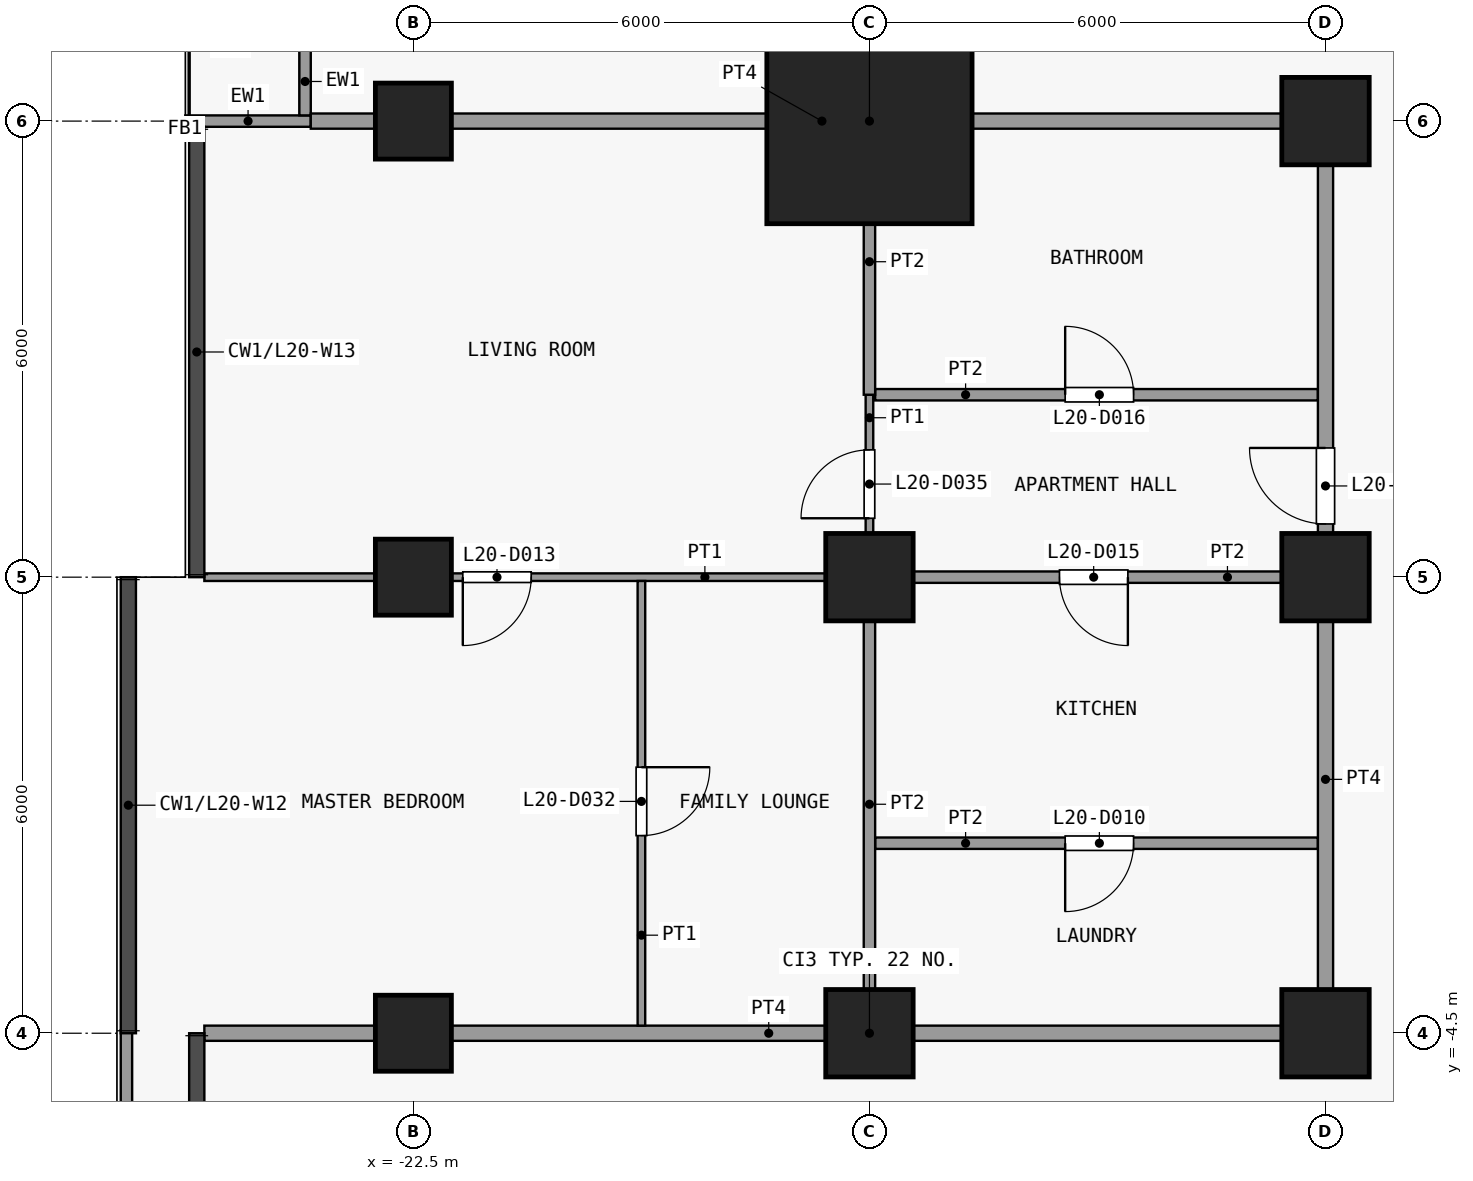
"""IFC4 building model, lengths in metres.
Left out: names, types, materials, properties, quantities, classifications, styles, units other than length and angle.
Written with IfcOpenShell. Run it as: python <this file> out.ifc"""

import sys

from ifc_helpers import new_model, si_unit, direction, frame, frame_2d, origin, origin_2d, place, context, subcontext, project, spatial, rectangle, extrude, element, fill, save


model = new_model("IFC4")
c1 = context("Model", 3, precision=1e-05, world=origin(), true_north=direction((0.0, 1.0)))
c2 = subcontext(c1, "Body", "Model", "MODEL_VIEW")
j1 = project(units=[si_unit("LENGTHUNIT", "METRE"), si_unit("PLANEANGLEUNIT", "RADIAN")], contexts=[c1])
p1 = place(None, origin())
s1 = spatial("IfcSite", under=j1, at=p1, CompositionType="ELEMENT")
p2 = place(p1, origin())
s2 = spatial("IfcBuilding", under=s1, at=p2, CompositionType="ELEMENT")
p3 = place(p2, frame((0.0, 0.0, 84.7)))
s3 = spatial("IfcBuildingStorey", under=s2, at=p3, CompositionType="ELEMENT", Elevation=84.7)
for number, where, z_axis, x_axis in (
    (1, (-22.5, -4.5, 0.0), (0.0, 0.0, 1.0), (1.0, 0.0, 0.0)),
    (2, (-22.5, 1.5, 0.0), (0.0, 0.0, 1.0), (1.0, 0.0, 0.0)),
    (3, (-22.5, 7.5, 0.0), (0.0, 0.0, 1.0), (1.0, 0.0, 0.0)),
):
    element("IfcColumn", number, at=place(p3, frame(where, z_axis=z_axis, x_axis=x_axis)), inside=s3, PredefinedType="COLUMN", context=c2, shape_type="SweptSolid", body=[
        extrude(rectangle(XDim=1.0, YDim=1.0, at=origin_2d()), origin(), (0.0, 0.0, 1.0), 3.6),
    ])
for number, where, z_axis, x_axis in (
    (4, (-16.5, -4.5, 0.0), (0.0, 0.0, 1.0), (1.0, 0.0, 0.0)),
    (5, (-16.5, 1.5, 0.0), (0.0, 0.0, 1.0), (1.0, 0.0, 0.0)),
):
    element("IfcColumn", number, at=place(p3, frame(where, z_axis=z_axis, x_axis=x_axis)), inside=s3, PredefinedType="COLUMN", context=c2, shape_type="SweptSolid", body=[
        extrude(rectangle(XDim=1.15, YDim=1.15, at=origin_2d()), origin(), (0.0, 0.0, 1.0), 3.6),
    ])
p4 = place(p3, frame((-16.5, 7.5, 0.0), z_axis=(0.0, 0.0, 1.0), x_axis=(1.0, 0.0, 0.0)))
e6 = element("IfcColumn", 6, at=p4, inside=s3, PredefinedType="COLUMN", context=c2, shape_type="SweptSolid", body=[
    extrude(rectangle(XDim=2.7, YDim=2.7, at=origin_2d()), origin(), (0.0, 0.0, 1.0), 3.6),
])
for number, where, z_axis, x_axis in (
    (7, (-10.5, -4.5, 0.0), (0.0, 0.0, 1.0), (1.0, 0.0, 0.0)),
    (8, (-10.5, 1.5, 0.0), (0.0, 0.0, 1.0), (1.0, 0.0, 0.0)),
    (9, (-10.5, 7.5, 0.0), (0.0, 0.0, 1.0), (1.0, 0.0, 0.0)),
):
    element("IfcColumn", number, at=place(p3, frame(where, z_axis=z_axis, x_axis=x_axis)), inside=s3, PredefinedType="COLUMN", context=c2, shape_type="SweptSolid", body=[
        extrude(rectangle(XDim=1.15, YDim=1.15, at=origin_2d()), origin(), (0.0, 0.0, 1.0), 3.6),
    ])
p5 = place(p3, frame((-23.85, 7.5, 0.0), z_axis=(0.0, 0.0, 1.0), x_axis=(-1.0, 0.0, 0.0)))
e10 = element("IfcWall", 10, at=p5, inside=s3, PredefinedType="SOLIDWALL", context=c2, shape_type="SweptSolid", body=[
    extrude(rectangle(XDim=1.65, YDim=0.15, at=frame_2d((0.825, 0.0))), origin(), (0.0, 0.0, 1.0), 3.3),
])
p6 = place(p3, frame((-23.925, 7.575, 0.0), z_axis=(0.0, 0.0, 1.0), x_axis=(0.0, 1.0, 0.0)))
e11 = element("IfcWall", 11, at=p6, inside=s3, PredefinedType="SOLIDWALL", context=c2, shape_type="SweptSolid", body=[
    extrude(rectangle(XDim=5.85, YDim=0.15, at=frame_2d((2.925, 0.0))), origin(), (0.0, 0.0, 1.0), 3.3),
])
p7 = place(p6, frame((3.825, 0.0, 0.0)))
e12 = element("IfcOpeningElement", 12, at=p7, cuts=e11, PredefinedType="OPENING", context=c2, shape_type="SweptSolid", body=[
    extrude(rectangle(XDim=1.2, YDim=2.4, at=frame_2d((0.6, 1.2))), frame((0.0, 0.085, 0.0), z_axis=(0.0, -1.0, 0.0), x_axis=(1.0, 0.0, 0.0)), (0.0, 0.0, 1.0), 0.17),
])
p8 = place(p6, frame((1.012, 0.0, 0.9)))
e13 = element("IfcOpeningElement", 13, at=p8, cuts=e11, PredefinedType="OPENING", context=c2, shape_type="SweptSolid", body=[
    extrude(rectangle(XDim=1.8, YDim=2.1, at=frame_2d((0.9, 1.05))), frame((0.0, 0.085, 0.0), z_axis=(0.0, -1.0, 0.0), x_axis=(1.0, 0.0, 0.0)), (0.0, 0.0, 1.0), 0.17),
])
p9 = place(p3, frame((-26.275, -13.3, 0.0), z_axis=(0.0, 0.0, 1.0), x_axis=(0.0, 1.0, 0.0)))
e14 = element("IfcWall", 14, at=p9, inside=s3, PredefinedType="PARAPET", context=c2, shape_type="SweptSolid", body=[
    extrude(rectangle(XDim=8.84, YDim=0.15, at=frame_2d((4.42, 0.0))), origin(), (0.0, 0.0, 1.0), 1.15),
])
p10 = place(p3, frame((-25.25, -4.5, 0.0), z_axis=(0.0, 0.0, 1.0), x_axis=(1.0, 0.0, 0.0)))
e15 = element("IfcWall", 15, at=p10, inside=s3, PredefinedType="PARTITIONING", context=c2, shape_type="SweptSolid", body=[
    extrude(rectangle(XDim=14.85, YDim=0.2, at=frame_2d((7.425, 0.0))), origin(), (0.0, 0.0, 1.0), 3.3),
])
p11 = place(p3, frame((-16.425, -2.0, 0.0), z_axis=(0.0, 0.0, 1.0), x_axis=(1.0, 0.0, 0.0)))
e16 = element("IfcWall", 16, at=p11, inside=s3, PredefinedType="PARTITIONING", context=c2, shape_type="SweptSolid", body=[
    extrude(rectangle(XDim=5.825, YDim=0.15, at=frame_2d((2.913, 0.0))), origin(), (0.0, 0.0, 1.0), 3.3),
])
p12 = place(p11, frame((2.5, 0.0, 0.0)))
e17 = element("IfcOpeningElement", 17, at=p12, cuts=e16, PredefinedType="OPENING", context=c2, shape_type="SweptSolid", body=[
    extrude(rectangle(XDim=0.9, YDim=2.1, at=frame_2d((0.45, 1.05))), frame((0.0, 0.085, 0.0), z_axis=(0.0, -1.0, 0.0), x_axis=(1.0, 0.0, 0.0)), (0.0, 0.0, 1.0), 0.17),
])
p13 = place(p3, frame((-25.25, 1.5, 0.0), z_axis=(0.0, 0.0, 1.0), x_axis=(1.0, 0.0, 0.0)))
e18 = element("IfcWall", 18, at=p13, inside=s3, PredefinedType="PARTITIONING", context=c2, shape_type="SweptSolid", body=[
    extrude(rectangle(XDim=8.75, YDim=0.1, at=frame_2d((4.375, 0.0))), origin(), (0.0, 0.0, 1.0), 3.3),
])
p14 = place(p13, frame((3.4, 0.0, 0.0)))
e19 = element("IfcOpeningElement", 19, at=p14, cuts=e18, PredefinedType="OPENING", context=c2, shape_type="SweptSolid", body=[
    extrude(rectangle(XDim=0.9, YDim=2.1, at=frame_2d((0.45, 1.05))), frame((0.0, 0.06, 0.0), z_axis=(0.0, -1.0, 0.0), x_axis=(1.0, 0.0, 0.0)), (0.0, 0.0, 1.0), 0.12),
])
p15 = place(p3, frame((-16.5, 1.5, 0.0), z_axis=(0.0, 0.0, 1.0), x_axis=(1.0, 0.0, 0.0)))
e20 = element("IfcWall", 20, at=p15, inside=s3, PredefinedType="PARTITIONING", context=c2, shape_type="SweptSolid", body=[
    extrude(rectangle(XDim=5.9, YDim=0.15, at=frame_2d((2.95, 0.0))), origin(), (0.0, 0.0, 1.0), 3.3),
])
p16 = place(p15, frame((2.5, 0.0, 0.0)))
e21 = element("IfcOpeningElement", 21, at=p16, cuts=e20, PredefinedType="OPENING", context=c2, shape_type="SweptSolid", body=[
    extrude(rectangle(XDim=0.9, YDim=2.1, at=frame_2d((0.45, 1.05))), frame((0.0, 0.085, 0.0), z_axis=(0.0, -1.0, 0.0), x_axis=(1.0, 0.0, 0.0)), (0.0, 0.0, 1.0), 0.17),
])
p17 = place(p3, frame((-16.425, 3.9, 0.0), z_axis=(0.0, 0.0, 1.0), x_axis=(1.0, 0.0, 0.0)))
e22 = element("IfcWall", 22, at=p17, inside=s3, PredefinedType="PARTITIONING", context=c2, shape_type="SweptSolid", body=[
    extrude(rectangle(XDim=5.825, YDim=0.15, at=frame_2d((2.913, 0.0))), origin(), (0.0, 0.0, 1.0), 3.3),
])
p18 = place(p17, frame((2.5, 0.0, 0.0)))
e23 = element("IfcOpeningElement", 23, at=p18, cuts=e22, PredefinedType="OPENING", context=c2, shape_type="SweptSolid", body=[
    extrude(rectangle(XDim=0.9, YDim=2.1, at=frame_2d((0.45, 1.05))), frame((0.0, 0.085, 0.0), z_axis=(0.0, -1.0, 0.0), x_axis=(1.0, 0.0, 0.0)), (0.0, 0.0, 1.0), 0.17),
])
p19 = place(p3, frame((-23.85, 7.5, 0.0), z_axis=(0.0, 0.0, 1.0), x_axis=(1.0, 0.0, 0.0)))
e24 = element("IfcWall", 24, at=p19, inside=s3, PredefinedType="PARTITIONING", context=c2, shape_type="SweptSolid", body=[
    extrude(rectangle(XDim=13.45, YDim=0.2, at=frame_2d((6.725, 0.0))), origin(), (0.0, 0.0, 1.0), 3.3),
])
p20 = place(p3, frame((-19.5, -4.4, 0.0), z_axis=(0.0, 0.0, 1.0), x_axis=(0.0, 1.0, 0.0)))
e25 = element("IfcWall", 25, at=p20, inside=s3, PredefinedType="PARTITIONING", context=c2, shape_type="SweptSolid", body=[
    extrude(rectangle(XDim=5.85, YDim=0.1, at=frame_2d((2.925, 0.0))), origin(), (0.0, 0.0, 1.0), 3.3),
])
p21 = place(p20, frame((2.5, 0.0, 0.0)))
e26 = element("IfcOpeningElement", 26, at=p21, cuts=e25, PredefinedType="OPENING", context=c2, shape_type="SweptSolid", body=[
    extrude(rectangle(XDim=0.9, YDim=2.1, at=frame_2d((0.45, 1.05))), frame((0.0, 0.06, 0.0), z_axis=(0.0, -1.0, 0.0), x_axis=(1.0, 0.0, 0.0)), (0.0, 0.0, 1.0), 0.12),
])
p22 = place(p3, frame((-16.5, 1.575, 0.0), z_axis=(0.0, 0.0, 1.0), x_axis=(0.0, 1.0, 0.0)))
e27 = element("IfcWall", 27, at=p22, inside=s3, PredefinedType="PARTITIONING", context=c2, shape_type="SweptSolid", body=[
    extrude(rectangle(XDim=2.325, YDim=0.1, at=frame_2d((1.163, 0.0))), origin(), (0.0, 0.0, 1.0), 3.3),
])
p23 = place(p22, frame((0.7, 0.0, 0.0)))
e28 = element("IfcOpeningElement", 28, at=p23, cuts=e27, PredefinedType="OPENING", context=c2, shape_type="SweptSolid", body=[
    extrude(rectangle(XDim=0.9, YDim=2.1, at=frame_2d((0.45, 1.05))), frame((0.0, 0.06, 0.0), z_axis=(0.0, -1.0, 0.0), x_axis=(1.0, 0.0, 0.0)), (0.0, 0.0, 1.0), 0.12),
])
p24 = place(p3, frame((-16.5, -4.4, 0.0), z_axis=(0.0, 0.0, 1.0), x_axis=(0.0, 1.0, 0.0)))
e29 = element("IfcWall", 29, at=p24, inside=s3, PredefinedType="PARTITIONING", context=c2, shape_type="SweptSolid", body=[
    extrude(rectangle(XDim=5.825, YDim=0.15, at=frame_2d((2.913, 0.0))), origin(), (0.0, 0.0, 1.0), 3.3),
])
p25 = place(p3, frame((-16.5, 3.9, 0.0), z_axis=(0.0, 0.0, 1.0), x_axis=(0.0, 1.0, 0.0)))
e30 = element("IfcWall", 30, at=p25, inside=s3, PredefinedType="PARTITIONING", context=c2, shape_type="SweptSolid", body=[
    extrude(rectangle(XDim=3.5, YDim=0.15, at=frame_2d((1.75, 0.0))), origin(), (0.0, 0.0, 1.0), 3.3),
])
p26 = place(p3, frame((-10.5, -4.4, 0.0), z_axis=(0.0, 0.0, 1.0), x_axis=(0.0, 1.0, 0.0)))
e31 = element("IfcWall", 31, at=p26, inside=s3, PredefinedType="PARTITIONING", context=c2, shape_type="SweptSolid", body=[
    extrude(rectangle(XDim=11.8, YDim=0.2, at=frame_2d((5.9, 0.0))), origin(), (0.0, 0.0, 1.0), 3.3),
])
p27 = place(p26, frame((6.6, 0.0, 0.0)))
e32 = element("IfcOpeningElement", 32, at=p27, cuts=e31, PredefinedType="OPENING", context=c2, shape_type="SweptSolid", body=[
    extrude(rectangle(XDim=1.0, YDim=2.1, at=frame_2d((0.5, 1.05))), frame((0.0, 0.11, 0.0), z_axis=(0.0, -1.0, 0.0), x_axis=(1.0, 0.0, 0.0)), (0.0, 0.0, 1.0), 0.22),
])
p28 = place(p12, origin())
e33 = element("IfcDoor", 33, at=p28, inside=s3, OperationType="SINGLE_SWING_LEFT", PredefinedType="DOOR", context=c2, shape_type="SweptSolid", body=[
    extrude(rectangle(XDim=0.9, YDim=2.1, at=frame_2d((0.45, 1.05))), frame((0.0, 0.025, 0.0), z_axis=(0.0, -1.0, 0.0), x_axis=(1.0, 0.0, 0.0)), (0.0, 0.0, 1.0), 0.05),
])
fill(e17, e33)
p29 = place(p14, origin())
e34 = element("IfcDoor", 34, at=p29, inside=s3, OperationType="SINGLE_SWING_LEFT", PredefinedType="DOOR", context=c2, shape_type="SweptSolid", body=[
    extrude(rectangle(XDim=0.9, YDim=2.1, at=frame_2d((0.45, 1.05))), frame((0.0, 0.025, 0.0), z_axis=(0.0, -1.0, 0.0), x_axis=(1.0, 0.0, 0.0)), (0.0, 0.0, 1.0), 0.05),
])
fill(e19, e34)
p30 = place(p16, origin())
e35 = element("IfcDoor", 35, at=p30, inside=s3, OperationType="SINGLE_SWING_RIGHT", PredefinedType="DOOR", context=c2, shape_type="SweptSolid", body=[
    extrude(rectangle(XDim=0.9, YDim=2.1, at=frame_2d((0.45, 1.05))), frame((0.0, 0.025, 0.0), z_axis=(0.0, -1.0, 0.0), x_axis=(1.0, 0.0, 0.0)), (0.0, 0.0, 1.0), 0.05),
])
fill(e21, e35)
p31 = place(p18, origin())
e36 = element("IfcDoor", 36, at=p31, inside=s3, OperationType="SINGLE_SWING_RIGHT", PredefinedType="DOOR", context=c2, shape_type="SweptSolid", body=[
    extrude(rectangle(XDim=0.9, YDim=2.1, at=frame_2d((0.45, 1.05))), frame((0.0, 0.025, 0.0), z_axis=(0.0, -1.0, 0.0), x_axis=(1.0, 0.0, 0.0)), (0.0, 0.0, 1.0), 0.05),
])
fill(e23, e36)
p32 = place(p21, origin())
e37 = element("IfcDoor", 37, at=p32, inside=s3, OperationType="SINGLE_SWING_RIGHT", PredefinedType="DOOR", context=c2, shape_type="SweptSolid", body=[
    extrude(rectangle(XDim=0.9, YDim=2.1, at=frame_2d((0.45, 1.05))), frame((0.0, 0.025, 0.0), z_axis=(0.0, -1.0, 0.0), x_axis=(1.0, 0.0, 0.0)), (0.0, 0.0, 1.0), 0.05),
])
fill(e26, e37)
p33 = place(p23, origin())
e38 = element("IfcDoor", 38, at=p33, inside=s3, OperationType="SINGLE_SWING_RIGHT", PredefinedType="DOOR", context=c2, shape_type="SweptSolid", body=[
    extrude(rectangle(XDim=0.9, YDim=2.1, at=frame_2d((0.45, 1.05))), frame((0.0, 0.025, 0.0), z_axis=(0.0, -1.0, 0.0), x_axis=(1.0, 0.0, 0.0)), (0.0, 0.0, 1.0), 0.05),
])
fill(e28, e38)
p34 = place(p27, origin())
e39 = element("IfcDoor", 39, at=p34, inside=s3, OperationType="SINGLE_SWING_LEFT", PredefinedType="DOOR", context=c2, shape_type="SweptSolid", body=[
    extrude(rectangle(XDim=1.0, YDim=2.1, at=frame_2d((0.5, 1.05))), frame((0.0, 0.025, 0.0), z_axis=(0.0, -1.0, 0.0), x_axis=(1.0, 0.0, 0.0)), (0.0, 0.0, 1.0), 0.05),
])
fill(e32, e39)
save(model, sys.argv[1])
